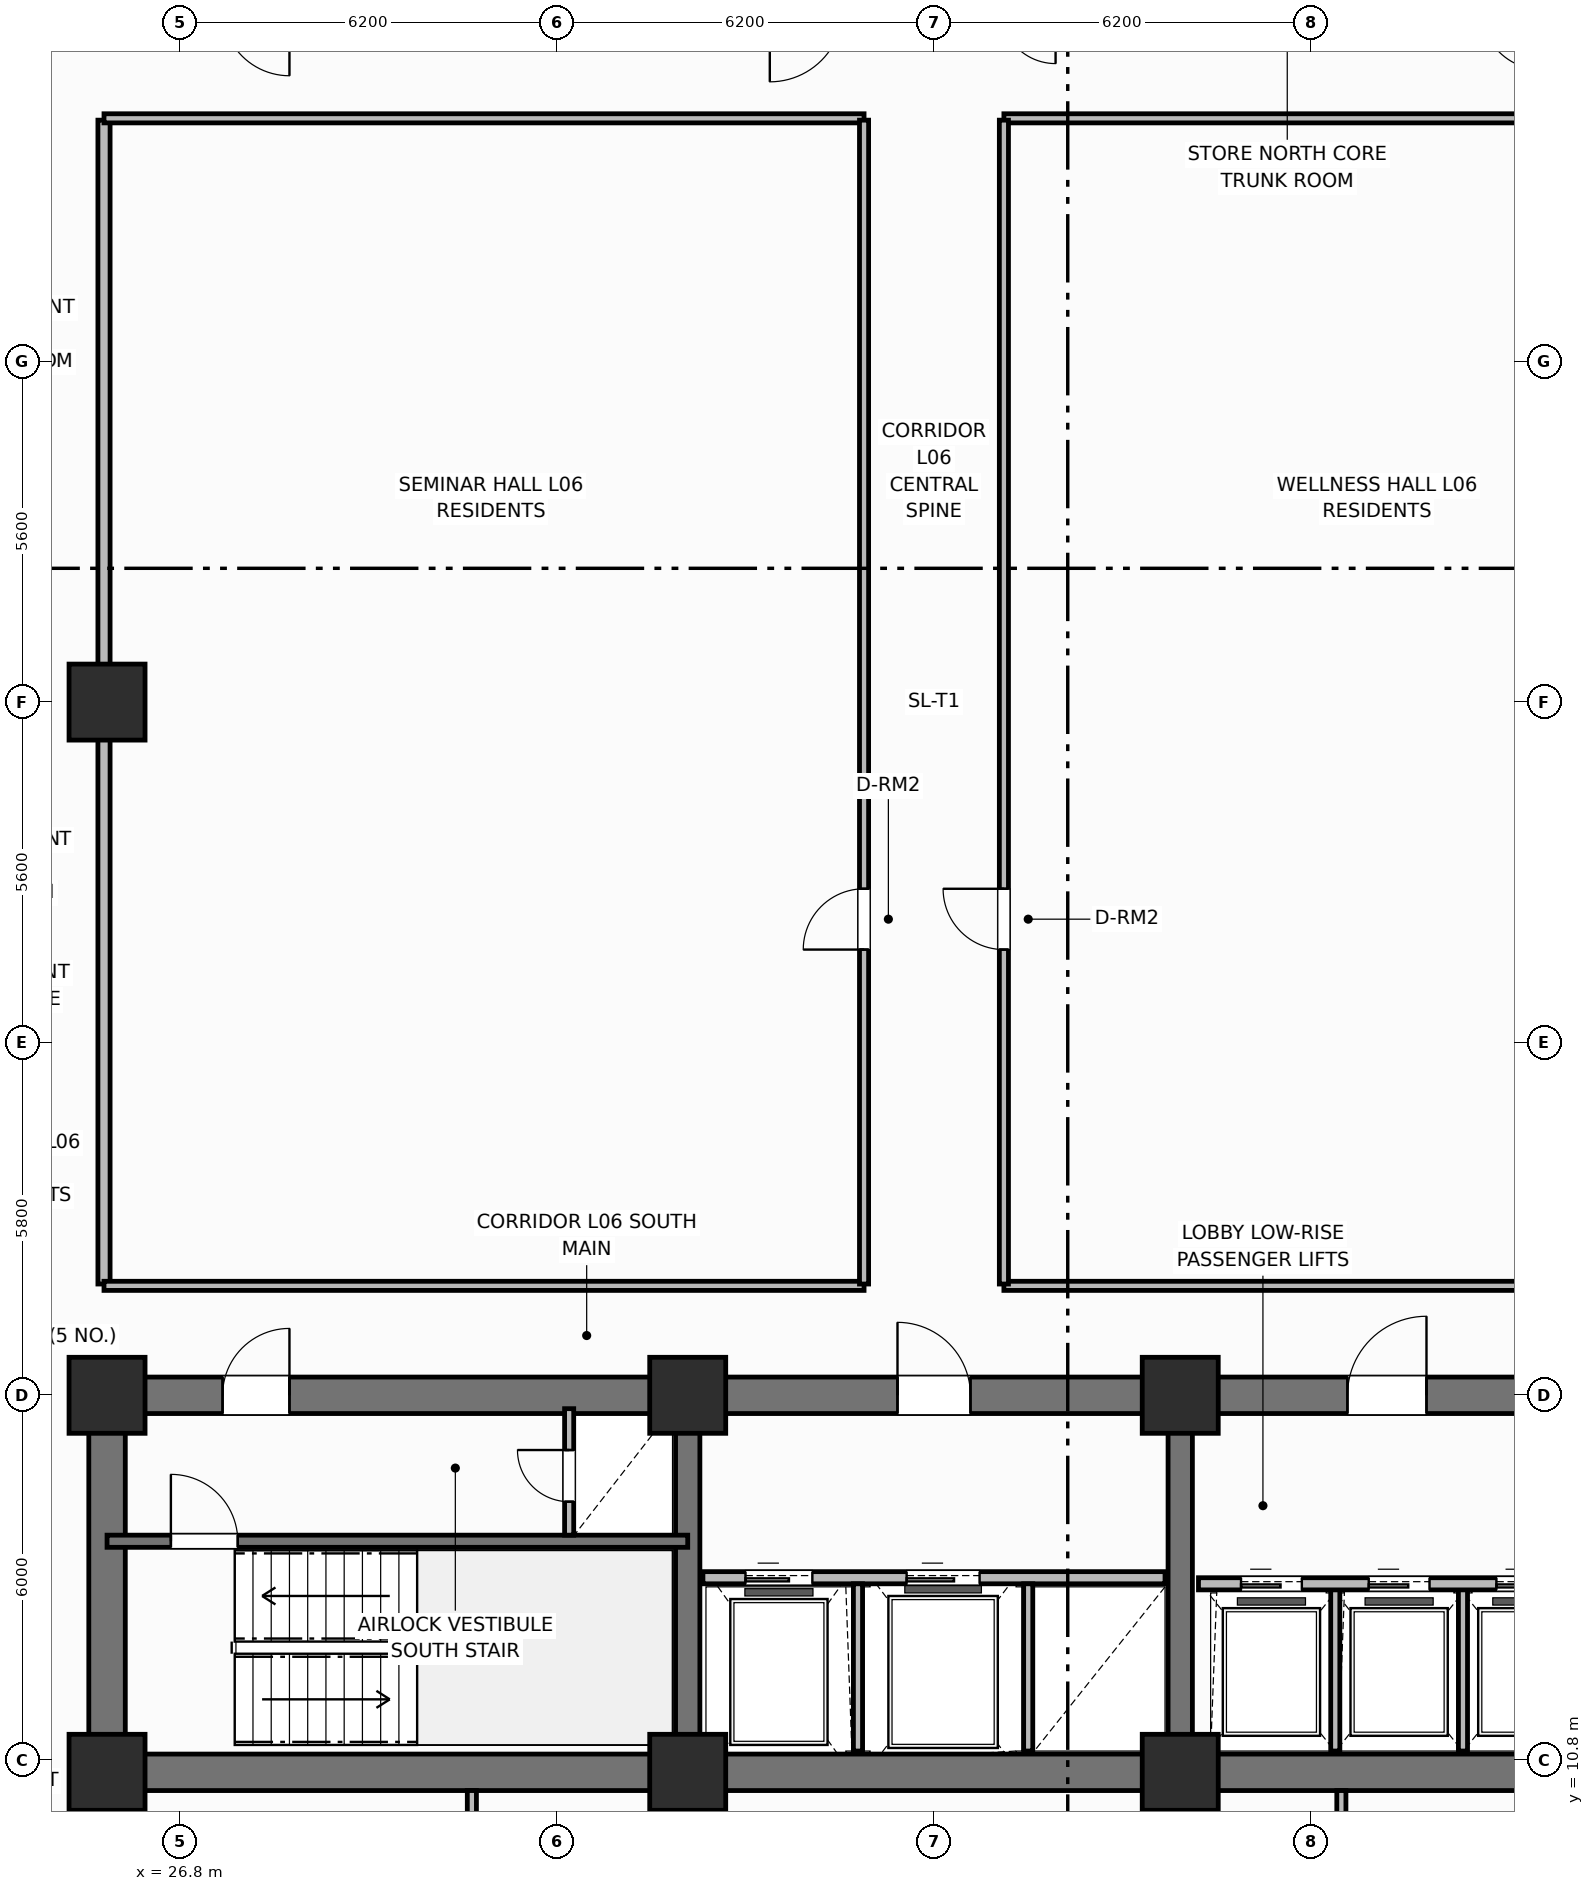
"""IFC4 building model, lengths in metres.
Left out: names, types, materials, properties, quantities, classifications, styles, units other than length and angle.
Written with IfcOpenShell. Run it as: python <this file> out.ifc"""

import sys

from ifc_helpers import new_model, si_unit, direction, frame, frame_2d, origin, origin_2d, place, context, subcontext, project, spatial, rectangle, extrude, element, fill, save


model = new_model("IFC4")
c1 = context("Model", 3, precision=1e-05, world=origin(), true_north=direction((0.0, 1.0)))
c2 = subcontext(c1, "Body", "Model", "MODEL_VIEW")
j1 = project(units=[si_unit("LENGTHUNIT", "METRE"), si_unit("PLANEANGLEUNIT", "RADIAN")], contexts=[c1])
p1 = place(None, origin())
s1 = spatial("IfcSite", under=j1, at=p1, CompositionType="ELEMENT")
p2 = place(p1, origin())
s2 = spatial("IfcBuilding", under=s1, at=p2, CompositionType="ELEMENT")
p3 = place(p2, frame((0.0, 0.0, 28.8)))
s3 = spatial("IfcBuildingStorey", under=s2, at=p3, CompositionType="ELEMENT", Elevation=28.8)
p4 = place(p3, frame((52.8, 10.6, 0.0), z_axis=(0.0, 0.0, 1.0), x_axis=(-1.0, 0.0, 0.0)))
e1 = element("IfcWall", 1, at=p4, inside=s3, PredefinedType="SHEAR", context=c2, shape_type="SweptSolid", body=[
    extrude(rectangle(XDim=27.2, YDim=0.6, at=frame_2d((13.6, 0.0))), origin(), (0.0, 0.0, 1.0), 3.7),
])
p5 = place(p3, frame((25.6, 10.9, 0.0), z_axis=(0.0, 0.0, 1.0), x_axis=(0.0, 1.0, 0.0)))
e2 = element("IfcWall", 2, at=p5, inside=s3, PredefinedType="SHEAR", context=c2, shape_type="SweptSolid", body=[
    extrude(rectangle(XDim=5.6, YDim=0.6, at=frame_2d((2.8, 0.0))), origin(), (0.0, 0.0, 1.0), 3.7),
])
p6 = place(p3, frame((25.6, 16.8, 0.0), z_axis=(0.0, 0.0, 1.0), x_axis=(1.0, 0.0, 0.0)))
e3 = element("IfcWall", 3, at=p6, inside=s3, PredefinedType="SHEAR", context=c2, shape_type="SweptSolid", body=[
    extrude(rectangle(XDim=27.2, YDim=0.6, at=frame_2d((13.6, 0.0))), origin(), (0.0, 0.0, 1.0), 3.7),
])
p7 = place(p6, frame((1.9, 0.0, 0.0)))
e4 = element("IfcOpeningElement", 4, at=p7, cuts=e3, PredefinedType="OPENING", context=c2, shape_type="SweptSolid", body=[
    extrude(rectangle(XDim=1.1, YDim=2.15, at=frame_2d((0.55, 1.075))), frame((0.0, 0.31, 0.0), z_axis=(0.0, -1.0, 0.0), x_axis=(1.0, 0.0, 0.0)), (0.0, 0.0, 1.0), 0.62),
])
p8 = place(p6, frame((13.0, 0.0, 0.0)))
e5 = element("IfcOpeningElement", 5, at=p8, cuts=e3, PredefinedType="OPENING", context=c2, shape_type="SweptSolid", body=[
    extrude(rectangle(XDim=1.2, YDim=2.15, at=frame_2d((0.6, 1.075))), frame((0.0, 0.31, 0.0), z_axis=(0.0, -1.0, 0.0), x_axis=(1.0, 0.0, 0.0)), (0.0, 0.0, 1.0), 0.62),
])
p9 = place(p6, frame((20.4, 0.0, 0.0)))
e6 = element("IfcOpeningElement", 6, at=p9, cuts=e3, PredefinedType="OPENING", context=c2, shape_type="SweptSolid", body=[
    extrude(rectangle(XDim=1.3, YDim=2.2, at=frame_2d((0.65, 1.1))), frame((0.0, 0.31, 0.0), z_axis=(0.0, -1.0, 0.0), x_axis=(1.0, 0.0, 0.0)), (0.0, 0.0, 1.0), 0.62),
])
p10 = place(p6, frame((24.65, 0.0, 0.0)))
e7 = element("IfcOpeningElement", 7, at=p10, cuts=e3, PredefinedType="OPENING", context=c2, shape_type="SweptSolid", body=[
    extrude(rectangle(XDim=0.85, YDim=2.1, at=frame_2d((0.425, 1.05))), frame((0.0, 0.31, 0.0), z_axis=(0.0, -1.0, 0.0), x_axis=(1.0, 0.0, 0.0)), (0.0, 0.0, 1.0), 0.62),
])
for number, where, z_axis, x_axis in (
    (8, (35.15, 10.9, 0.0), (0.0, 0.0, 1.0), (0.0, 1.0, 0.0)),
    (9, (43.25, 10.9, 0.0), (0.0, 0.0, 1.0), (0.0, 1.0, 0.0)),
):
    element("IfcWall", number, at=place(p3, frame(where, z_axis=z_axis, x_axis=x_axis)), inside=s3, PredefinedType="SHEAR", context=c2, shape_type="SweptSolid", body=[
        extrude(rectangle(XDim=5.6, YDim=0.4, at=frame_2d((2.8, 0.0))), origin(), (0.0, 0.0, 1.0), 3.7),
    ])
for number, where, z_axis, x_axis in (
    (10, (25.6, 10.6, 0.0), (0.0, 0.0, 1.0), (1.0, 0.0, 0.0)),
    (11, (25.6, 16.8, 0.0), (0.0, 0.0, 1.0), (1.0, 0.0, 0.0)),
    (12, (35.15, 10.6, 0.0), (0.0, 0.0, 1.0), (1.0, 0.0, 0.0)),
    (13, (35.15, 16.8, 0.0), (0.0, 0.0, 1.0), (1.0, 0.0, 0.0)),
    (14, (43.25, 10.6, 0.0), (0.0, 0.0, 1.0), (1.0, 0.0, 0.0)),
    (15, (43.25, 16.8, 0.0), (0.0, 0.0, 1.0), (1.0, 0.0, 0.0)),
    (16, (25.6, 28.2, 0.0), (0.0, 0.0, 1.0), (1.0, 0.0, 0.0)),
):
    element("IfcColumn", number, at=place(p3, frame(where, z_axis=z_axis, x_axis=x_axis)), inside=s3, PredefinedType="COLUMN", context=c2, shape_type="SweptSolid", body=[
        extrude(rectangle(XDim=1.25, YDim=1.25, at=origin_2d()), origin(), (0.0, 0.0, 1.0), 3.7),
    ])
p11 = place(p3, frame((25.6, 14.4, 0.0), z_axis=(0.0, 0.0, 1.0), x_axis=(1.0, 0.0, 0.0)))
e17 = element("IfcWall", 17, at=p11, inside=s3, PredefinedType="SHEAR", context=c2, shape_type="SweptSolid", body=[
    extrude(rectangle(XDim=9.55, YDim=0.2, at=frame_2d((4.775, 0.0))), origin(), (0.0, 0.0, 1.0), 3.7),
])
p12 = place(p11, frame((1.05, 0.0, 0.0)))
e18 = element("IfcOpeningElement", 18, at=p12, cuts=e17, PredefinedType="OPENING", context=c2, shape_type="SweptSolid", body=[
    extrude(rectangle(XDim=1.1, YDim=2.15, at=frame_2d((0.55, 1.075))), frame((0.0, 0.11, 0.0), z_axis=(0.0, -1.0, 0.0), x_axis=(1.0, 0.0, 0.0)), (0.0, 0.0, 1.0), 0.22),
])
p13 = place(p3, frame((33.2, 14.5, 0.0), z_axis=(0.0, 0.0, 1.0), x_axis=(0.0, 1.0, 0.0)))
e19 = element("IfcWall", 19, at=p13, inside=s3, PredefinedType="PARTITIONING", context=c2, shape_type="SweptSolid", body=[
    extrude(rectangle(XDim=2.08, YDim=0.15, at=frame_2d((1.04, 0.0))), origin(), (0.0, 0.0, 1.0), 2.53),
])
p14 = place(p13, frame((0.55, 0.0, 0.0)))
e20 = element("IfcOpeningElement", 20, at=p14, cuts=e19, PredefinedType="OPENING", context=c2, shape_type="SweptSolid", body=[
    extrude(rectangle(XDim=0.85, YDim=2.05, at=frame_2d((0.425, 1.025))), frame((0.0, 0.085, 0.0), z_axis=(0.0, -1.0, 0.0), x_axis=(1.0, 0.0, 0.0)), (0.0, 0.0, 1.0), 0.17),
])
p15 = place(p3, frame((35.4, 13.8, 0.0), z_axis=(0.0, 0.0, 1.0), x_axis=(1.0, 0.0, 0.0)))
e21 = element("IfcWall", 21, at=p15, inside=s3, PredefinedType="PARTITIONING", context=c2, shape_type="SweptSolid", body=[
    extrude(rectangle(XDim=7.6, YDim=0.2, at=frame_2d((3.8, 0.0))), origin(), (0.0, 0.0, 1.0), 2.3),
])
p16 = place(p15, frame((0.7, 0.0, 0.0)))
e22 = element("IfcOpeningElement", 22, at=p16, cuts=e21, PredefinedType="OPENING", context=c2, shape_type="SweptSolid", body=[
    extrude(rectangle(XDim=1.1, YDim=2.15, at=frame_2d((0.55, 1.075))), frame((0.0, 0.11, 0.0), z_axis=(0.0, -1.0, 0.0), x_axis=(1.0, 0.0, 0.0)), (0.0, 0.0, 1.0), 0.22),
])
p17 = place(p15, frame((3.35, 0.0, 0.0)))
e23 = element("IfcOpeningElement", 23, at=p17, cuts=e21, PredefinedType="OPENING", context=c2, shape_type="SweptSolid", body=[
    extrude(rectangle(XDim=1.2, YDim=2.15, at=frame_2d((0.6, 1.075))), frame((0.0, 0.11, 0.0), z_axis=(0.0, -1.0, 0.0), x_axis=(1.0, 0.0, 0.0)), (0.0, 0.0, 1.0), 0.22),
])
for number, where, z_axis, x_axis in (
    (24, (37.95, 10.95, 0.0), (0.0, 0.0, 1.0), (0.0, 1.0, 0.0)),
    (25, (40.75, 10.95, 0.0), (0.0, 0.0, 1.0), (0.0, 1.0, 0.0)),
):
    element("IfcWall", number, at=place(p3, frame(where, z_axis=z_axis, x_axis=x_axis)), inside=s3, PredefinedType="PARTITIONING", context=c2, shape_type="SweptSolid", body=[
        extrude(rectangle(XDim=2.75, YDim=0.15, at=frame_2d((1.375, 0.0))), origin(), (0.0, 0.0, 1.0), 2.53),
    ])
for number, where, z_axis, x_axis in (
    (26, (45.8, 10.95, 0.0), (0.0, 0.0, 1.0), (0.0, 1.0, 0.0)),
    (27, (47.9, 10.95, 0.0), (0.0, 0.0, 1.0), (0.0, 1.0, 0.0)),
):
    element("IfcWall", number, at=place(p3, frame(where, z_axis=z_axis, x_axis=x_axis)), inside=s3, PredefinedType="PARTITIONING", context=c2, shape_type="SweptSolid", body=[
        extrude(rectangle(XDim=2.7, YDim=0.15, at=frame_2d((1.35, 0.0))), origin(), (0.0, 0.0, 1.0), 2.53),
    ])
p18 = place(p3, frame((43.55, 13.7, 0.0), z_axis=(0.0, 0.0, 1.0), x_axis=(1.0, 0.0, 0.0)))
e28 = element("IfcWall", 28, at=p18, inside=s3, PredefinedType="PARTITIONING", context=c2, shape_type="SweptSolid", body=[
    extrude(rectangle(XDim=6.4, YDim=0.2, at=frame_2d((3.2, 0.0))), origin(), (0.0, 0.0, 1.0), 2.53),
])
p19 = place(p18, frame((0.7, 0.0, 0.0)))
e29 = element("IfcOpeningElement", 29, at=p19, cuts=e28, PredefinedType="OPENING", context=c2, shape_type="SweptSolid", body=[
    extrude(rectangle(XDim=1.0, YDim=2.15, at=frame_2d((0.5, 1.075))), frame((0.0, 0.11, 0.0), z_axis=(0.0, -1.0, 0.0), x_axis=(1.0, 0.0, 0.0)), (0.0, 0.0, 1.0), 0.22),
])
p20 = place(p18, frame((2.8, 0.0, 0.0)))
e30 = element("IfcOpeningElement", 30, at=p20, cuts=e28, PredefinedType="OPENING", context=c2, shape_type="SweptSolid", body=[
    extrude(rectangle(XDim=1.0, YDim=2.15, at=frame_2d((0.5, 1.075))), frame((0.0, 0.11, 0.0), z_axis=(0.0, -1.0, 0.0), x_axis=(1.0, 0.0, 0.0)), (0.0, 0.0, 1.0), 0.22),
])
p21 = place(p18, frame((4.9, 0.0, 0.0)))
e31 = element("IfcOpeningElement", 31, at=p21, cuts=e28, PredefinedType="OPENING", context=c2, shape_type="SweptSolid", body=[
    extrude(rectangle(XDim=1.0, YDim=2.15, at=frame_2d((0.5, 1.075))), frame((0.0, 0.11, 0.0), z_axis=(0.0, -1.0, 0.0), x_axis=(1.0, 0.0, 0.0)), (0.0, 0.0, 1.0), 0.22),
])
p22 = place(p3, frame((25.55, 18.63, 0.0), z_axis=(0.0, 0.0, 1.0), x_axis=(0.0, 1.0, 0.0)))
e32 = element("IfcWall", 32, at=p22, inside=s3, PredefinedType="PARTITIONING", context=c2, shape_type="SweptSolid", body=[
    extrude(rectangle(XDim=19.14, YDim=0.2, at=frame_2d((9.57, 0.0))), origin(), (0.0, 0.0, 1.0), 2.53),
])
for number, where, z_axis, x_axis in (
    (33, (25.55, 18.6, 0.0), (0.0, 0.0, 1.0), (1.0, 0.0, 0.0)),
    (34, (40.35, 18.6, 0.0), (0.0, 0.0, 1.0), (1.0, 0.0, 0.0)),
    (35, (25.55, 37.8, 0.0), (0.0, 0.0, 1.0), (1.0, 0.0, 0.0)),
    (36, (40.35, 37.8, 0.0), (0.0, 0.0, 1.0), (1.0, 0.0, 0.0)),
):
    element("IfcWall", number, at=place(p3, frame(where, z_axis=z_axis, x_axis=x_axis)), inside=s3, PredefinedType="PARTITIONING", context=c2, shape_type="SweptSolid", body=[
        extrude(rectangle(XDim=12.5, YDim=0.15, at=frame_2d((6.25, 0.0))), origin(), (0.0, 0.0, 1.0), 2.53),
    ])
p23 = place(p3, frame((38.05, 18.63, 0.0), z_axis=(0.0, 0.0, 1.0), x_axis=(0.0, 1.0, 0.0)))
e37 = element("IfcWall", 37, at=p23, inside=s3, PredefinedType="PARTITIONING", context=c2, shape_type="SweptSolid", body=[
    extrude(rectangle(XDim=19.14, YDim=0.15, at=frame_2d((9.57, 0.0))), origin(), (0.0, 0.0, 1.0), 2.53),
])
p24 = place(p23, frame((5.5, 0.0, 0.0)))
e38 = element("IfcOpeningElement", 38, at=p24, cuts=e37, PredefinedType="OPENING", context=c2, shape_type="SweptSolid", body=[
    extrude(rectangle(XDim=1.0, YDim=2.15, at=frame_2d((0.5, 1.075))), frame((0.0, 0.085, 0.0), z_axis=(0.0, -1.0, 0.0), x_axis=(1.0, 0.0, 0.0)), (0.0, 0.0, 1.0), 0.17),
])
p25 = place(p3, frame((40.35, 18.63, 0.0), z_axis=(0.0, 0.0, 1.0), x_axis=(0.0, 1.0, 0.0)))
e39 = element("IfcWall", 39, at=p25, inside=s3, PredefinedType="PARTITIONING", context=c2, shape_type="SweptSolid", body=[
    extrude(rectangle(XDim=19.14, YDim=0.15, at=frame_2d((9.57, 0.0))), origin(), (0.0, 0.0, 1.0), 2.53),
])
p26 = place(p25, frame((5.5, 0.0, 0.0)))
e40 = element("IfcOpeningElement", 40, at=p26, cuts=e39, PredefinedType="OPENING", context=c2, shape_type="SweptSolid", body=[
    extrude(rectangle(XDim=1.0, YDim=2.15, at=frame_2d((0.5, 1.075))), frame((0.0, 0.085, 0.0), z_axis=(0.0, -1.0, 0.0), x_axis=(1.0, 0.0, 0.0)), (0.0, 0.0, 1.0), 0.17),
])
p27 = place(p3, frame((31.6, 4.97, 0.0), z_axis=(0.0, 0.0, 1.0), x_axis=(0.0, 1.0, 0.0)))
e41 = element("IfcWall", 41, at=p27, inside=s3, PredefinedType="PARTITIONING", context=c2, shape_type="SweptSolid", body=[
    extrude(rectangle(XDim=5.33, YDim=0.15, at=frame_2d((2.665, 0.0))), origin(), (0.0, 0.0, 1.0), 2.53),
])
p28 = place(p27, frame((1.25, 0.0, 0.0)))
e42 = element("IfcOpeningElement", 42, at=p28, cuts=e41, PredefinedType="OPENING", context=c2, shape_type="SweptSolid", body=[
    extrude(rectangle(XDim=0.9, YDim=2.1, at=frame_2d((0.45, 1.05))), frame((0.0, 0.085, 0.0), z_axis=(0.0, -1.0, 0.0), x_axis=(1.0, 0.0, 0.0)), (0.0, 0.0, 1.0), 0.17),
])
p29 = place(p3, frame((45.9, 4.97, 0.0), z_axis=(0.0, 0.0, 1.0), x_axis=(0.0, 1.0, 0.0)))
e43 = element("IfcWall", 43, at=p29, inside=s3, PredefinedType="PARTITIONING", context=c2, shape_type="SweptSolid", body=[
    extrude(rectangle(XDim=5.33, YDim=0.15, at=frame_2d((2.665, 0.0))), origin(), (0.0, 0.0, 1.0), 2.53),
])
p30 = place(p3, frame((25.4, 5.57, 0.0), z_axis=(0.0, 0.0, 1.0), x_axis=(0.0, 1.0, 0.0)))
e44 = element("IfcWall", 44, at=p30, inside=s3, PredefinedType="PARTITIONING", context=c2, shape_type="SweptSolid", body=[
    extrude(rectangle(XDim=4.73, YDim=0.2, at=frame_2d((2.365, 0.0))), origin(), (0.0, 0.0, 1.0), 2.53),
])
p31 = place(p30, frame((1.3, 0.0, 0.0)))
e45 = element("IfcOpeningElement", 45, at=p31, cuts=e44, PredefinedType="OPENING", context=c2, shape_type="SweptSolid", body=[
    extrude(rectangle(XDim=0.9, YDim=2.1, at=frame_2d((0.45, 1.05))), frame((0.0, 0.11, 0.0), z_axis=(0.0, -1.0, 0.0), x_axis=(1.0, 0.0, 0.0)), (0.0, 0.0, 1.0), 0.22),
])
p32 = place(p12, origin())
e46 = element("IfcDoor", 46, at=p32, inside=s3, OperationType="SINGLE_SWING_LEFT", PredefinedType="DOOR", context=c2, shape_type="SweptSolid", body=[
    extrude(rectangle(XDim=1.1, YDim=2.15, at=frame_2d((0.55, 1.075))), frame((0.0, 0.025, 0.0), z_axis=(0.0, -1.0, 0.0), x_axis=(1.0, 0.0, 0.0)), (0.0, 0.0, 1.0), 0.05),
])
fill(e18, e46)
p33 = place(p14, origin())
e47 = element("IfcDoor", 47, at=p33, inside=s3, OperationType="SINGLE_SWING_RIGHT", PredefinedType="TRAPDOOR", context=c2, shape_type="SweptSolid", body=[
    extrude(rectangle(XDim=0.85, YDim=2.05, at=frame_2d((0.425, 1.025))), frame((0.0, 0.025, 0.0), z_axis=(0.0, -1.0, 0.0), x_axis=(1.0, 0.0, 0.0)), (0.0, 0.0, 1.0), 0.05),
])
fill(e20, e47)
p34 = place(p16, origin())
e48 = element("IfcDoor", 48, at=p34, inside=s3, OperationType="SLIDING_TO_LEFT", PredefinedType="DOOR", context=c2, shape_type="SweptSolid", body=[
    extrude(rectangle(XDim=1.1, YDim=2.15, at=frame_2d((0.55, 1.075))), frame((0.0, 0.025, 0.0), z_axis=(0.0, -1.0, 0.0), x_axis=(1.0, 0.0, 0.0)), (0.0, 0.0, 1.0), 0.05),
])
fill(e22, e48)
p35 = place(p17, origin())
e49 = element("IfcDoor", 49, at=p35, inside=s3, OperationType="SLIDING_TO_LEFT", PredefinedType="DOOR", context=c2, shape_type="SweptSolid", body=[
    extrude(rectangle(XDim=1.2, YDim=2.15, at=frame_2d((0.6, 1.075))), frame((0.0, 0.025, 0.0), z_axis=(0.0, -1.0, 0.0), x_axis=(1.0, 0.0, 0.0)), (0.0, 0.0, 1.0), 0.05),
])
fill(e23, e49)
p36 = place(p19, origin())
e50 = element("IfcDoor", 50, at=p36, inside=s3, OperationType="SLIDING_TO_LEFT", PredefinedType="DOOR", context=c2, shape_type="SweptSolid", body=[
    extrude(rectangle(XDim=1.0, YDim=2.15, at=frame_2d((0.5, 1.075))), frame((0.0, 0.025, 0.0), z_axis=(0.0, -1.0, 0.0), x_axis=(1.0, 0.0, 0.0)), (0.0, 0.0, 1.0), 0.05),
])
fill(e29, e50)
p37 = place(p20, origin())
e51 = element("IfcDoor", 51, at=p37, inside=s3, OperationType="SLIDING_TO_LEFT", PredefinedType="DOOR", context=c2, shape_type="SweptSolid", body=[
    extrude(rectangle(XDim=1.0, YDim=2.15, at=frame_2d((0.5, 1.075))), frame((0.0, 0.025, 0.0), z_axis=(0.0, -1.0, 0.0), x_axis=(1.0, 0.0, 0.0)), (0.0, 0.0, 1.0), 0.05),
])
fill(e30, e51)
p38 = place(p21, origin())
e52 = element("IfcDoor", 52, at=p38, inside=s3, OperationType="SLIDING_TO_LEFT", PredefinedType="DOOR", context=c2, shape_type="SweptSolid", body=[
    extrude(rectangle(XDim=1.0, YDim=2.15, at=frame_2d((0.5, 1.075))), frame((0.0, 0.025, 0.0), z_axis=(0.0, -1.0, 0.0), x_axis=(1.0, 0.0, 0.0)), (0.0, 0.0, 1.0), 0.05),
])
fill(e31, e52)
p39 = place(p24, origin())
e53 = element("IfcDoor", 53, at=p39, inside=s3, OperationType="SINGLE_SWING_LEFT", PredefinedType="DOOR", context=c2, shape_type="SweptSolid", body=[
    extrude(rectangle(XDim=1.0, YDim=2.15, at=frame_2d((0.5, 1.075))), frame((0.0, 0.025, 0.0), z_axis=(0.0, -1.0, 0.0), x_axis=(1.0, 0.0, 0.0)), (0.0, 0.0, 1.0), 0.05),
])
fill(e38, e53)
p40 = place(p26, origin())
e54 = element("IfcDoor", 54, at=p40, inside=s3, OperationType="SINGLE_SWING_RIGHT", PredefinedType="DOOR", context=c2, shape_type="SweptSolid", body=[
    extrude(rectangle(XDim=1.0, YDim=2.15, at=frame_2d((0.5, 1.075))), frame((0.0, 0.025, 0.0), z_axis=(0.0, -1.0, 0.0), x_axis=(1.0, 0.0, 0.0)), (0.0, 0.0, 1.0), 0.05),
])
fill(e40, e54)
p41 = place(p7, origin())
e55 = element("IfcDoor", 55, at=p41, inside=s3, OperationType="SINGLE_SWING_RIGHT", PredefinedType="DOOR", context=c2, shape_type="SweptSolid", body=[
    extrude(rectangle(XDim=1.1, YDim=2.15, at=frame_2d((0.55, 1.075))), frame((0.0, 0.025, 0.0), z_axis=(0.0, -1.0, 0.0), x_axis=(1.0, 0.0, 0.0)), (0.0, 0.0, 1.0), 0.05),
])
fill(e4, e55)
p42 = place(p8, origin())
e56 = element("IfcDoor", 56, at=p42, inside=s3, OperationType="SINGLE_SWING_LEFT", PredefinedType="DOOR", context=c2, shape_type="SweptSolid", body=[
    extrude(rectangle(XDim=1.2, YDim=2.15, at=frame_2d((0.6, 1.075))), frame((0.0, 0.025, 0.0), z_axis=(0.0, -1.0, 0.0), x_axis=(1.0, 0.0, 0.0)), (0.0, 0.0, 1.0), 0.05),
])
fill(e5, e56)
p43 = place(p9, origin())
e57 = element("IfcDoor", 57, at=p43, inside=s3, OperationType="SINGLE_SWING_RIGHT", PredefinedType="DOOR", context=c2, shape_type="SweptSolid", body=[
    extrude(rectangle(XDim=1.3, YDim=2.2, at=frame_2d((0.65, 1.1))), frame((0.0, 0.025, 0.0), z_axis=(0.0, -1.0, 0.0), x_axis=(1.0, 0.0, 0.0)), (0.0, 0.0, 1.0), 0.05),
])
fill(e6, e57)
save(model, sys.argv[1])
